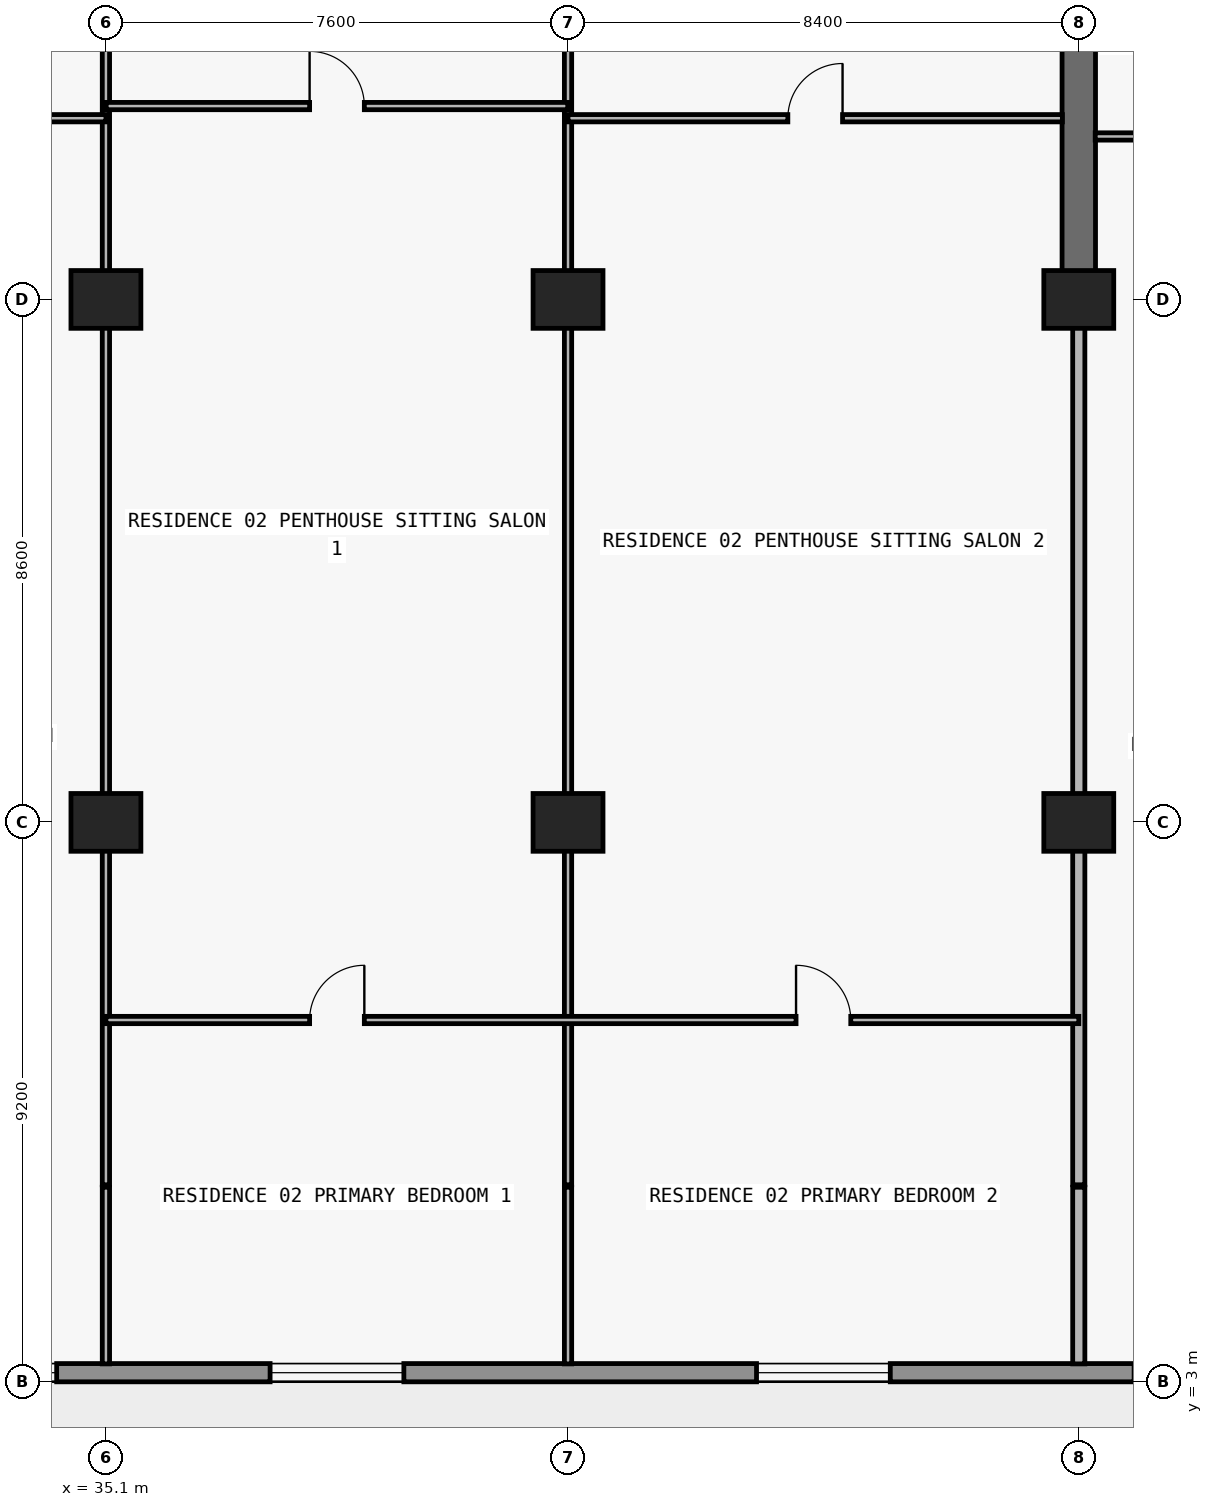
"""IFC4 building model, lengths in metres.
Left out: names, types, materials, properties, quantities, classifications, styles, units other than length and angle.
Written with IfcOpenShell. Run it as: python <this file> out.ifc"""

import sys

from ifc_helpers import new_model, si_unit, direction, frame, frame_2d, origin, origin_2d, place, context, subcontext, project, spatial, rectangle, extrude, element, fill, save


model = new_model("IFC4")
c1 = context("Model", 3, precision=1e-05, world=origin(), true_north=direction((0.0, 1.0)))
c2 = subcontext(c1, "Body", "Model", "MODEL_VIEW")
j1 = project(units=[si_unit("LENGTHUNIT", "METRE"), si_unit("PLANEANGLEUNIT", "RADIAN")], contexts=[c1])
p1 = place(None, origin())
s1 = spatial("IfcSite", under=j1, at=p1, CompositionType="ELEMENT")
p2 = place(p1, origin())
s2 = spatial("IfcBuilding", under=s1, at=p2, CompositionType="ELEMENT")
p3 = place(p2, frame((0.0, 0.0, 76.2)))
s3 = spatial("IfcBuildingStorey", under=s2, at=p3, CompositionType="ELEMENT", Elevation=76.2)
for number, where, z_axis, x_axis in (
    (1, (35.1, 12.2, 0.0), (0.0, 0.0, 1.0), (1.0, 0.0, 0.0)),
    (2, (42.7, 12.2, 0.0), (0.0, 0.0, 1.0), (1.0, 0.0, 0.0)),
    (3, (51.1, 12.2, 0.0), (0.0, 0.0, 1.0), (1.0, 0.0, 0.0)),
    (4, (35.1, 20.8, 0.0), (0.0, 0.0, 1.0), (1.0, 0.0, 0.0)),
    (5, (42.7, 20.8, 0.0), (0.0, 0.0, 1.0), (1.0, 0.0, 0.0)),
    (6, (51.1, 20.8, 0.0), (0.0, 0.0, 1.0), (1.0, 0.0, 0.0)),
):
    element("IfcColumn", number, at=place(p3, frame(where, z_axis=z_axis, x_axis=x_axis)), inside=s3, PredefinedType="COLUMN", context=c2, shape_type="SweptSolid", body=[
        extrude(rectangle(XDim=1.15, YDim=0.95, at=origin_2d()), origin(), (0.0, 0.0, 1.0), 3.0),
    ])
p4 = place(p3, frame((51.1, 20.8, 0.0), z_axis=(0.0, 0.0, 1.0), x_axis=(0.0, 1.0, 0.0)))
e7 = element("IfcWall", 7, at=p4, inside=s3, PredefinedType="SHEAR", context=c2, shape_type="SweptSolid", body=[
    extrude(rectangle(XDim=8.6, YDim=0.55, at=frame_2d((4.3, 0.0))), origin(), (0.0, 0.0, 1.0), 3.0),
])
p5 = place(p3, frame((72.7, 3.15, 0.0), z_axis=(0.0, 0.0, 1.0), x_axis=(-1.0, 0.0, 0.0)))
e8 = element("IfcWall", 8, at=p5, inside=s3, PredefinedType="STANDARD", context=c2, shape_type="SweptSolid", body=[
    extrude(rectangle(XDim=67.6, YDim=0.3, at=frame_2d((33.8, 0.0))), origin(), (0.0, 0.0, 1.0), 3.0),
])
p6 = place(p5, frame((59.89, 0.0, 0.0)))
e9 = element("IfcOpeningElement", 9, at=p6, cuts=e8, PredefinedType="OPENING", context=c2, shape_type="SweptSolid", body=[
    extrude(rectangle(XDim=2.0, YDim=2.3, at=frame_2d((1.0, 1.15))), frame((0.0, 0.16, 0.0), z_axis=(0.0, -1.0, 0.0), x_axis=(1.0, 0.0, 0.0)), (0.0, 0.0, 1.0), 0.32),
])
p7 = place(p5, frame((55.21, 0.0, 0.65)))
e10 = element("IfcOpeningElement", 10, at=p7, cuts=e8, PredefinedType="OPENING", context=c2, shape_type="SweptSolid", body=[
    extrude(rectangle(XDim=2.6, YDim=1.85, at=frame_2d((1.3, 0.925))), frame((0.0, 0.16, 0.0), z_axis=(0.0, -1.0, 0.0), x_axis=(1.0, 0.0, 0.0)), (0.0, 0.0, 1.0), 0.32),
])
p8 = place(p5, frame((49.1, 0.0, 0.85)))
e11 = element("IfcOpeningElement", 11, at=p8, cuts=e8, PredefinedType="OPENING", context=c2, shape_type="SweptSolid", body=[
    extrude(rectangle(XDim=2.2, YDim=1.55, at=frame_2d((1.1, 0.775))), frame((0.0, 0.16, 0.0), z_axis=(0.0, -1.0, 0.0), x_axis=(1.0, 0.0, 0.0)), (0.0, 0.0, 1.0), 0.32),
])
p9 = place(p5, frame((43.09, 0.0, 0.0)))
e12 = element("IfcOpeningElement", 12, at=p9, cuts=e8, PredefinedType="OPENING", context=c2, shape_type="SweptSolid", body=[
    extrude(rectangle(XDim=2.0, YDim=2.3, at=frame_2d((1.0, 1.15))), frame((0.0, 0.16, 0.0), z_axis=(0.0, -1.0, 0.0), x_axis=(1.0, 0.0, 0.0)), (0.0, 0.0, 1.0), 0.32),
])
p10 = place(p5, frame((38.41, 0.0, 0.65)))
e13 = element("IfcOpeningElement", 13, at=p10, cuts=e8, PredefinedType="OPENING", context=c2, shape_type="SweptSolid", body=[
    extrude(rectangle(XDim=2.6, YDim=1.85, at=frame_2d((1.3, 0.925))), frame((0.0, 0.16, 0.0), z_axis=(0.0, -1.0, 0.0), x_axis=(1.0, 0.0, 0.0)), (0.0, 0.0, 1.0), 0.32),
])
p11 = place(p5, frame((32.7, 0.0, 0.85)))
e14 = element("IfcOpeningElement", 14, at=p11, cuts=e8, PredefinedType="OPENING", context=c2, shape_type="SweptSolid", body=[
    extrude(rectangle(XDim=2.2, YDim=1.55, at=frame_2d((1.1, 0.775))), frame((0.0, 0.16, 0.0), z_axis=(0.0, -1.0, 0.0), x_axis=(1.0, 0.0, 0.0)), (0.0, 0.0, 1.0), 0.32),
])
p12 = place(p5, frame((24.7, 0.0, 0.85)))
e15 = element("IfcOpeningElement", 15, at=p12, cuts=e8, PredefinedType="OPENING", context=c2, shape_type="SweptSolid", body=[
    extrude(rectangle(XDim=2.2, YDim=1.55, at=frame_2d((1.1, 0.775))), frame((0.0, 0.16, 0.0), z_axis=(0.0, -1.0, 0.0), x_axis=(1.0, 0.0, 0.0)), (0.0, 0.0, 1.0), 0.32),
])
p13 = place(p5, frame((18.69, 0.0, 0.0)))
e16 = element("IfcOpeningElement", 16, at=p13, cuts=e8, PredefinedType="OPENING", context=c2, shape_type="SweptSolid", body=[
    extrude(rectangle(XDim=2.0, YDim=2.3, at=frame_2d((1.0, 1.15))), frame((0.0, 0.16, 0.0), z_axis=(0.0, -1.0, 0.0), x_axis=(1.0, 0.0, 0.0)), (0.0, 0.0, 1.0), 0.32),
])
p14 = place(p5, frame((14.01, 0.0, 0.65)))
e17 = element("IfcOpeningElement", 17, at=p14, cuts=e8, PredefinedType="OPENING", context=c2, shape_type="SweptSolid", body=[
    extrude(rectangle(XDim=2.6, YDim=1.85, at=frame_2d((1.3, 0.925))), frame((0.0, 0.16, 0.0), z_axis=(0.0, -1.0, 0.0), x_axis=(1.0, 0.0, 0.0)), (0.0, 0.0, 1.0), 0.32),
])
p15 = place(p5, frame((7.9, 0.0, 0.85)))
e18 = element("IfcOpeningElement", 18, at=p15, cuts=e8, PredefinedType="OPENING", context=c2, shape_type="SweptSolid", body=[
    extrude(rectangle(XDim=2.2, YDim=1.55, at=frame_2d((1.1, 0.775))), frame((0.0, 0.16, 0.0), z_axis=(0.0, -1.0, 0.0), x_axis=(1.0, 0.0, 0.0)), (0.0, 0.0, 1.0), 0.32),
])
p16 = place(p3, frame((35.1, 3.295, 0.0), z_axis=(0.0, 0.0, 1.0), x_axis=(0.0, 1.0, 0.0)))
e19 = element("IfcWall", 19, at=p16, inside=s3, PredefinedType="PARTITIONING", context=c2, shape_type="SweptSolid", body=[
    extrude(rectangle(XDim=2.905, YDim=0.12, at=frame_2d((1.453, 0.0))), origin(), (0.0, 0.0, 1.0), 3.0),
])
p17 = place(p3, frame((35.1, 6.24, 0.0), z_axis=(0.0, 0.0, 1.0), x_axis=(0.0, 1.0, 0.0)))
e20 = element("IfcWall", 20, at=p17, inside=s3, PredefinedType="PARTITIONING", context=c2, shape_type="SweptSolid", body=[
    extrude(rectangle(XDim=27.96, YDim=0.12, at=frame_2d((13.98, 0.0))), origin(), (0.0, 0.0, 1.0), 2.06),
])
p18 = place(p17, frame((19.49, 0.0, 0.0)))
e21 = element("IfcOpeningElement", 21, at=p18, cuts=e20, PredefinedType="OPENING", context=c2, shape_type="SweptSolid", body=[
    extrude(rectangle(XDim=0.9, YDim=2.01, at=frame_2d((0.45, 1.005))), frame((0.0, 0.07, 0.0), z_axis=(0.0, -1.0, 0.0), x_axis=(1.0, 0.0, 0.0)), (0.0, 0.0, 1.0), 0.14),
])
p19 = place(p3, frame((42.7, 3.295, 0.0), z_axis=(0.0, 0.0, 1.0), x_axis=(0.0, 1.0, 0.0)))
e22 = element("IfcWall", 22, at=p19, inside=s3, PredefinedType="PARTITIONING", context=c2, shape_type="SweptSolid", body=[
    extrude(rectangle(XDim=2.905, YDim=0.12, at=frame_2d((1.453, 0.0))), origin(), (0.0, 0.0, 1.0), 3.0),
])
p20 = place(p3, frame((42.7, 6.24, 0.0), z_axis=(0.0, 0.0, 1.0), x_axis=(0.0, 1.0, 0.0)))
e23 = element("IfcWall", 23, at=p20, inside=s3, PredefinedType="PARTITIONING", context=c2, shape_type="SweptSolid", body=[
    extrude(rectangle(XDim=27.96, YDim=0.12, at=frame_2d((13.98, 0.0))), origin(), (0.0, 0.0, 1.0), 2.06),
])
p21 = place(p20, frame((19.49, 0.0, 0.0)))
e24 = element("IfcOpeningElement", 24, at=p21, cuts=e23, PredefinedType="OPENING", context=c2, shape_type="SweptSolid", body=[
    extrude(rectangle(XDim=0.9, YDim=2.01, at=frame_2d((0.45, 1.005))), frame((0.0, 0.07, 0.0), z_axis=(0.0, -1.0, 0.0), x_axis=(1.0, 0.0, 0.0)), (0.0, 0.0, 1.0), 0.14),
])
p22 = place(p3, frame((51.1, 3.295, 0.0), z_axis=(0.0, 0.0, 1.0), x_axis=(0.0, 1.0, 0.0)))
e25 = element("IfcWall", 25, at=p22, inside=s3, PredefinedType="PARTITIONING", context=c2, shape_type="SweptSolid", body=[
    extrude(rectangle(XDim=2.905, YDim=0.2, at=frame_2d((1.453, 0.0))), origin(), (0.0, 0.0, 1.0), 3.0),
])
p23 = place(p3, frame((51.1, 6.24, 0.0), z_axis=(0.0, 0.0, 1.0), x_axis=(0.0, 1.0, 0.0)))
e26 = element("IfcWall", 26, at=p23, inside=s3, PredefinedType="PARTITIONING", context=c2, shape_type="SweptSolid", body=[
    extrude(rectangle(XDim=14.555, YDim=0.2, at=frame_2d((7.277, 0.0))), origin(), (0.0, 0.0, 1.0), 2.06),
])
p24 = place(p3, frame((35.1, 8.95, 0.0), z_axis=(0.0, 0.0, 1.0), x_axis=(1.0, 0.0, 0.0)))
e27 = element("IfcWall", 27, at=p24, inside=s3, PredefinedType="PARTITIONING", context=c2, shape_type="SweptSolid", body=[
    extrude(rectangle(XDim=16.0, YDim=0.12, at=frame_2d((8.0, 0.0))), origin(), (0.0, 0.0, 1.0), 3.0),
])
p25 = place(p24, frame((3.35, 0.0, 0.0)))
e28 = element("IfcOpeningElement", 28, at=p25, cuts=e27, PredefinedType="OPENING", context=c2, shape_type="SweptSolid", body=[
    extrude(rectangle(XDim=0.9, YDim=2.15, at=frame_2d((0.45, 1.075))), frame((0.0, 0.07, 0.0), z_axis=(0.0, -1.0, 0.0), x_axis=(1.0, 0.0, 0.0)), (0.0, 0.0, 1.0), 0.14),
])
p26 = place(p24, frame((11.35, 0.0, 0.0)))
e29 = element("IfcOpeningElement", 29, at=p26, cuts=e27, PredefinedType="OPENING", context=c2, shape_type="SweptSolid", body=[
    extrude(rectangle(XDim=0.9, YDim=2.15, at=frame_2d((0.45, 1.075))), frame((0.0, 0.07, 0.0), z_axis=(0.0, -1.0, 0.0), x_axis=(1.0, 0.0, 0.0)), (0.0, 0.0, 1.0), 0.14),
])
p27 = place(p3, frame((51.37, 23.48, 0.0), z_axis=(0.0, 0.0, 1.0), x_axis=(1.0, 0.0, 0.0)))
e30 = element("IfcWall", 30, at=p27, inside=s3, PredefinedType="PARTITIONING", context=c2, shape_type="SweptSolid", body=[
    extrude(rectangle(XDim=8.13, YDim=0.12, at=frame_2d((4.065, 0.0))), origin(), (0.0, 0.0, 1.0), 3.0),
])
p28 = place(p27, frame((1.305, 0.0, 0.0)))
e31 = element("IfcOpeningElement", 31, at=p28, cuts=e30, PredefinedType="OPENING", context=c2, shape_type="SweptSolid", body=[
    extrude(rectangle(XDim=0.9, YDim=2.15, at=frame_2d((0.45, 1.075))), frame((0.0, 0.07, 0.0), z_axis=(0.0, -1.0, 0.0), x_axis=(1.0, 0.0, 0.0)), (0.0, 0.0, 1.0), 0.14),
])
p29 = place(p3, frame((26.97, 23.78, 0.0), z_axis=(0.0, 0.0, 1.0), x_axis=(1.0, 0.0, 0.0)))
e32 = element("IfcWall", 32, at=p29, inside=s3, PredefinedType="PARTITIONING", context=c2, shape_type="SweptSolid", body=[
    extrude(rectangle(XDim=8.13, YDim=0.12, at=frame_2d((4.065, 0.0))), origin(), (0.0, 0.0, 1.0), 3.0),
])
p30 = place(p29, frame((1.179, 0.0, 0.0)))
e33 = element("IfcOpeningElement", 33, at=p30, cuts=e32, PredefinedType="OPENING", context=c2, shape_type="SweptSolid", body=[
    extrude(rectangle(XDim=0.9, YDim=2.15, at=frame_2d((0.45, 1.075))), frame((0.0, 0.07, 0.0), z_axis=(0.0, -1.0, 0.0), x_axis=(1.0, 0.0, 0.0)), (0.0, 0.0, 1.0), 0.14),
])
p31 = place(p3, frame((42.7, 23.78, 0.0), z_axis=(0.0, 0.0, 1.0), x_axis=(1.0, 0.0, 0.0)))
e34 = element("IfcWall", 34, at=p31, inside=s3, PredefinedType="PARTITIONING", context=c2, shape_type="SweptSolid", body=[
    extrude(rectangle(XDim=8.13, YDim=0.12, at=frame_2d((4.065, 0.0))), origin(), (0.0, 0.0, 1.0), 3.0),
])
p32 = place(p31, frame((3.615, 0.0, 0.0)))
e35 = element("IfcOpeningElement", 35, at=p32, cuts=e34, PredefinedType="OPENING", context=c2, shape_type="SweptSolid", body=[
    extrude(rectangle(XDim=0.9, YDim=2.15, at=frame_2d((0.45, 1.075))), frame((0.0, 0.07, 0.0), z_axis=(0.0, -1.0, 0.0), x_axis=(1.0, 0.0, 0.0)), (0.0, 0.0, 1.0), 0.14),
])
p33 = place(p3, frame((35.105, 23.98, 0.0), z_axis=(0.0, 0.0, 1.0), x_axis=(1.0, 0.0, 0.0)))
e36 = element("IfcWall", 36, at=p33, inside=s3, PredefinedType="PARTITIONING", context=c2, shape_type="SweptSolid", body=[
    extrude(rectangle(XDim=7.59, YDim=0.12, at=frame_2d((3.795, 0.0))), origin(), (0.0, 0.0, 1.0), 3.0),
])
p34 = place(p33, frame((3.345, 0.0, 0.0)))
e37 = element("IfcOpeningElement", 37, at=p34, cuts=e36, PredefinedType="OPENING", context=c2, shape_type="SweptSolid", body=[
    extrude(rectangle(XDim=0.9, YDim=2.15, at=frame_2d((0.45, 1.075))), frame((0.0, 0.07, 0.0), z_axis=(0.0, -1.0, 0.0), x_axis=(1.0, 0.0, 0.0)), (0.0, 0.0, 1.0), 0.14),
])
p35 = place(p10, origin())
e38 = element("IfcWindow", 38, at=p35, inside=s3, PartitioningType="SINGLE_PANEL", PredefinedType="WINDOW", context=c2, shape_type="SweptSolid", body=[
    extrude(rectangle(XDim=2.6, YDim=1.85, at=frame_2d((1.3, 0.925))), frame((0.0, 0.03, 0.0), z_axis=(0.0, -1.0, 0.0), x_axis=(1.0, 0.0, 0.0)), (0.0, 0.0, 1.0), 0.06),
])
fill(e13, e38)
p36 = place(p11, origin())
e39 = element("IfcWindow", 39, at=p36, inside=s3, PartitioningType="SINGLE_PANEL", PredefinedType="WINDOW", context=c2, shape_type="SweptSolid", body=[
    extrude(rectangle(XDim=2.2, YDim=1.55, at=frame_2d((1.1, 0.775))), frame((0.0, 0.03, 0.0), z_axis=(0.0, -1.0, 0.0), x_axis=(1.0, 0.0, 0.0)), (0.0, 0.0, 1.0), 0.06),
])
fill(e14, e39)
p37 = place(p12, origin())
e40 = element("IfcWindow", 40, at=p37, inside=s3, PartitioningType="SINGLE_PANEL", PredefinedType="WINDOW", context=c2, shape_type="SweptSolid", body=[
    extrude(rectangle(XDim=2.2, YDim=1.55, at=frame_2d((1.1, 0.775))), frame((0.0, 0.03, 0.0), z_axis=(0.0, -1.0, 0.0), x_axis=(1.0, 0.0, 0.0)), (0.0, 0.0, 1.0), 0.06),
])
fill(e15, e40)
p38 = place(p34, origin())
e41 = element("IfcDoor", 41, at=p38, inside=s3, OperationType="SINGLE_SWING_LEFT", PredefinedType="DOOR", context=c2, shape_type="SweptSolid", body=[
    extrude(rectangle(XDim=0.9, YDim=2.15, at=frame_2d((0.45, 1.075))), frame((0.0, 0.025, 0.0), z_axis=(0.0, -1.0, 0.0), x_axis=(1.0, 0.0, 0.0)), (0.0, 0.0, 1.0), 0.05),
])
fill(e37, e41)
p39 = place(p25, origin())
e42 = element("IfcDoor", 42, at=p39, inside=s3, OperationType="SINGLE_SWING_RIGHT", PredefinedType="DOOR", context=c2, shape_type="SweptSolid", body=[
    extrude(rectangle(XDim=0.9, YDim=2.15, at=frame_2d((0.45, 1.075))), frame((0.0, 0.025, 0.0), z_axis=(0.0, -1.0, 0.0), x_axis=(1.0, 0.0, 0.0)), (0.0, 0.0, 1.0), 0.05),
])
fill(e28, e42)
p40 = place(p32, origin())
e43 = element("IfcDoor", 43, at=p40, inside=s3, OperationType="SINGLE_SWING_RIGHT", PredefinedType="DOOR", context=c2, shape_type="SweptSolid", body=[
    extrude(rectangle(XDim=0.9, YDim=2.15, at=frame_2d((0.45, 1.075))), frame((0.0, 0.025, 0.0), z_axis=(0.0, -1.0, 0.0), x_axis=(1.0, 0.0, 0.0)), (0.0, 0.0, 1.0), 0.05),
])
fill(e35, e43)
p41 = place(p26, origin())
e44 = element("IfcDoor", 44, at=p41, inside=s3, OperationType="SINGLE_SWING_LEFT", PredefinedType="DOOR", context=c2, shape_type="SweptSolid", body=[
    extrude(rectangle(XDim=0.9, YDim=2.15, at=frame_2d((0.45, 1.075))), frame((0.0, 0.025, 0.0), z_axis=(0.0, -1.0, 0.0), x_axis=(1.0, 0.0, 0.0)), (0.0, 0.0, 1.0), 0.05),
])
fill(e29, e44)
save(model, sys.argv[1])
